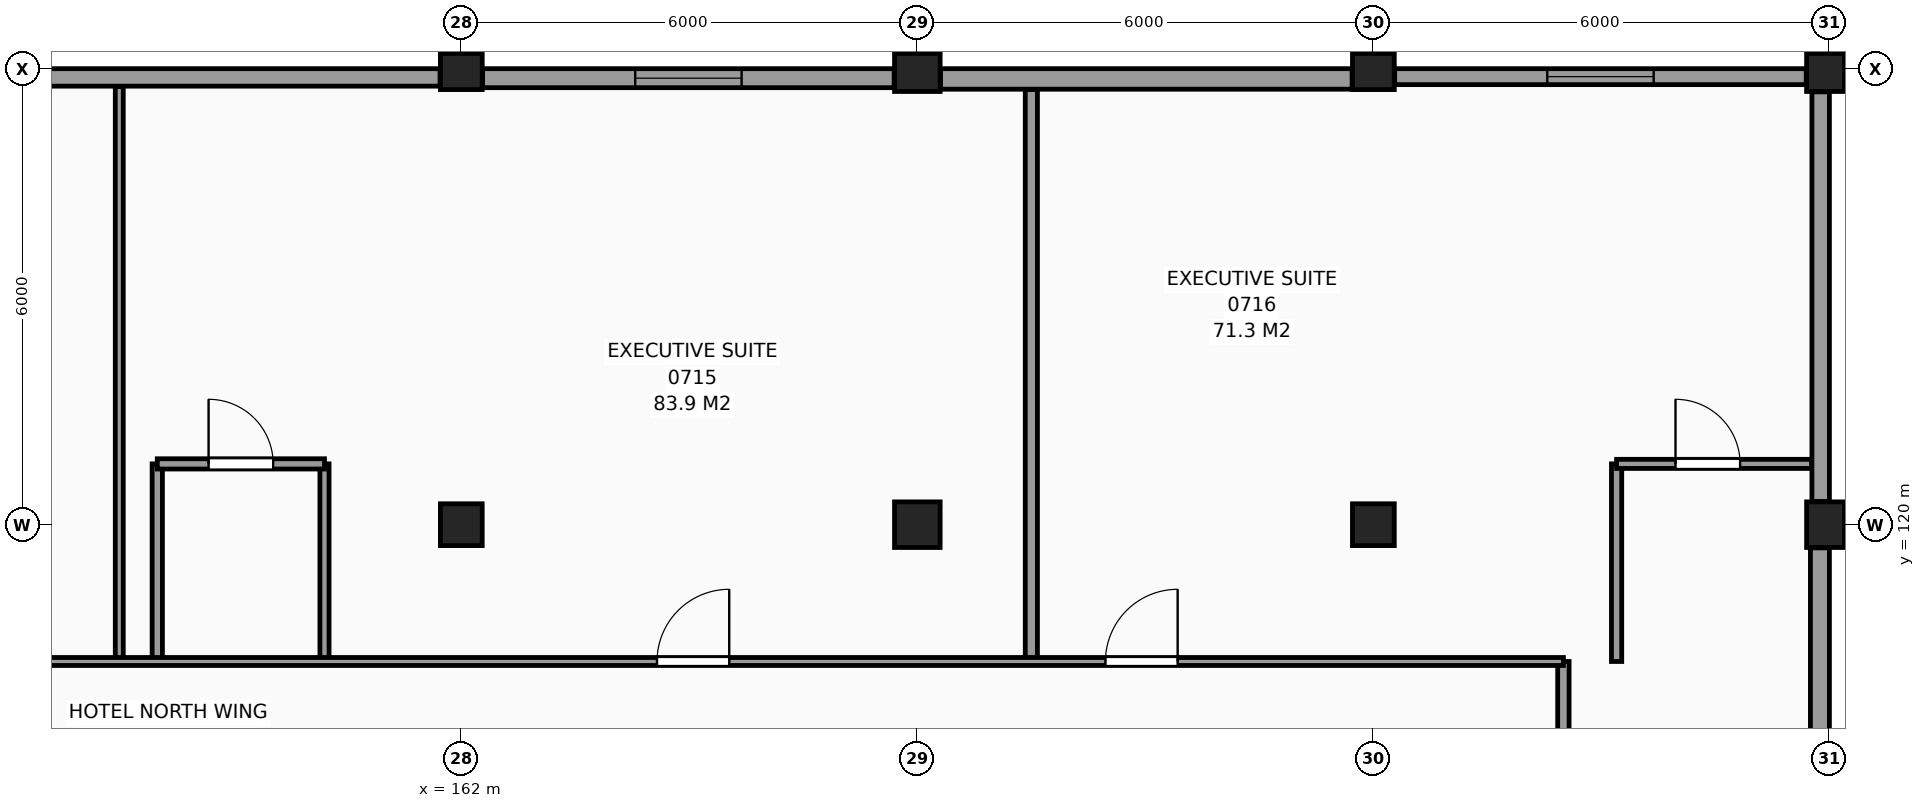
"""IFC4 building model, lengths in metres.
Left out: names, types, materials, properties, quantities, classifications, styles, units other than length and angle.
Written with IfcOpenShell. Run it as: python <this file> out.ifc"""

import sys

from ifc_helpers import new_model, si_unit, direction, frame, frame_2d, origin, origin_2d, place, context, subcontext, project, spatial, rectangle, extrude, element, fill, save


model = new_model("IFC4")
c1 = context("Model", 3, precision=1e-05, world=origin(), true_north=direction((0.0, 1.0)))
c2 = subcontext(c1, "Body", "Model", "MODEL_VIEW")
j1 = project(units=[si_unit("LENGTHUNIT", "METRE"), si_unit("PLANEANGLEUNIT", "RADIAN")], contexts=[c1])
p1 = place(None, origin())
s1 = spatial("IfcSite", under=j1, at=p1, CompositionType="ELEMENT")
p2 = place(p1, origin())
s2 = spatial("IfcBuilding", under=s1, at=p2, CompositionType="ELEMENT")
p3 = place(p2, frame((0.0, 0.0, 31.5)))
s3 = spatial("IfcBuildingStorey", under=s2, at=p3, CompositionType="ELEMENT", Elevation=31.5)
for number, where, z_axis, x_axis in (
    (1, (162.0, 120.0, 0.0), (0.0, 0.0, 1.0), (1.0, 0.0, 0.0)),
    (2, (162.0, 126.0, 0.0), (0.0, 0.0, 1.0), (1.0, 0.0, 0.0)),
):
    element("IfcColumn", number, at=place(p3, frame(where, z_axis=z_axis, x_axis=x_axis)), inside=s3, PredefinedType="COLUMN", context=c2, shape_type="SweptSolid", body=[
        extrude(rectangle(XDim=0.55, YDim=0.55, at=origin_2d()), origin(), (0.0, 0.0, 1.0), 3.3),
    ])
for number, where, z_axis, x_axis in (
    (3, (168.0, 120.0, 0.0), (0.0, 0.0, 1.0), (1.0, 0.0, 0.0)),
    (4, (168.0, 126.0, 0.0), (0.0, 0.0, 1.0), (1.0, 0.0, 0.0)),
):
    element("IfcColumn", number, at=place(p3, frame(where, z_axis=z_axis, x_axis=x_axis)), inside=s3, PredefinedType="COLUMN", context=c2, shape_type="SweptSolid", body=[
        extrude(rectangle(XDim=0.6, YDim=0.6, at=origin_2d()), origin(), (0.0, 0.0, 1.0), 3.3),
    ])
for number, where, z_axis, x_axis in (
    (5, (174.0, 120.0, 0.0), (0.0, 0.0, 1.0), (1.0, 0.0, 0.0)),
    (6, (174.0, 126.0, 0.0), (0.0, 0.0, 1.0), (1.0, 0.0, 0.0)),
):
    element("IfcColumn", number, at=place(p3, frame(where, z_axis=z_axis, x_axis=x_axis)), inside=s3, PredefinedType="COLUMN", context=c2, shape_type="SweptSolid", body=[
        extrude(rectangle(XDim=0.55, YDim=0.55, at=origin_2d()), origin(), (0.0, 0.0, 1.0), 3.3),
    ])
for number, where, z_axis, x_axis in (
    (7, (180.0, 120.0, 0.0), (0.0, 0.0, 1.0), (1.0, 0.0, 0.0)),
    (8, (180.0, 126.0, 0.0), (0.0, 0.0, 1.0), (1.0, 0.0, 0.0)),
):
    element("IfcColumn", number, at=place(p3, frame(where, z_axis=z_axis, x_axis=x_axis)), inside=s3, PredefinedType="COLUMN", context=c2, shape_type="SweptSolid", body=[
        extrude(rectangle(XDim=0.6, YDim=0.6, at=origin_2d()), origin(), (0.0, 0.0, 1.0), 3.3),
    ])
p4 = place(p3, frame((179.875, 114.305, 0.0), z_axis=(0.0, 0.0, 1.0), x_axis=(0.0, 1.0, 0.0)))
e9 = element("IfcWall", 9, at=p4, inside=s3, PredefinedType="SOLIDWALL", context=c2, shape_type="SweptSolid", body=[
    extrude(rectangle(XDim=5.39, YDim=0.25, at=frame_2d((2.695, 0.0))), origin(), (0.0, 0.0, 1.0), 2.42),
])
p5 = place(p3, frame((179.885, 120.305, 0.0), z_axis=(0.0, 0.0, 1.0), x_axis=(0.0, 1.0, 0.0)))
e10 = element("IfcWall", 10, at=p5, inside=s3, PredefinedType="SOLIDWALL", context=c2, shape_type="SweptSolid", body=[
    extrude(rectangle(XDim=5.39, YDim=0.23, at=frame_2d((2.695, 0.0))), origin(), (0.0, 0.0, 1.0), 2.42),
])
p6 = place(p3, frame((179.695, 125.895, 0.0), z_axis=(0.0, 0.0, 1.0), x_axis=(-1.0, 0.0, 0.0)))
e11 = element("IfcWall", 11, at=p6, inside=s3, PredefinedType="SOLIDWALL", context=c2, shape_type="SweptSolid", body=[
    extrude(rectangle(XDim=5.415, YDim=0.21, at=frame_2d((2.708, 0.0))), origin(), (0.0, 0.0, 1.0), 2.42),
])
p7 = place(p6, frame((2.007, 0.0, 0.8)))
e12 = element("IfcOpeningElement", 12, at=p7, cuts=e11, PredefinedType="OPENING", context=c2, shape_type="SweptSolid", body=[
    extrude(rectangle(XDim=1.4, YDim=1.4, at=frame_2d((0.7, 0.7))), frame((0.0, 0.115, 0.0), z_axis=(0.0, -1.0, 0.0), x_axis=(1.0, 0.0, 0.0)), (0.0, 0.0, 1.0), 0.23),
])
p8 = place(p3, frame((173.72, 125.865, 0.0), z_axis=(0.0, 0.0, 1.0), x_axis=(-1.0, 0.0, 0.0)))
e13 = element("IfcWall", 13, at=p8, inside=s3, PredefinedType="SOLIDWALL", context=c2, shape_type="SweptSolid", body=[
    extrude(rectangle(XDim=5.415, YDim=0.27, at=frame_2d((2.708, 0.0))), origin(), (0.0, 0.0, 1.0), 2.42),
])
p9 = place(p3, frame((167.695, 125.875, 0.0), z_axis=(0.0, 0.0, 1.0), x_axis=(-1.0, 0.0, 0.0)))
e14 = element("IfcWall", 14, at=p9, inside=s3, PredefinedType="SOLIDWALL", context=c2, shape_type="SweptSolid", body=[
    extrude(rectangle(XDim=5.415, YDim=0.25, at=frame_2d((2.708, 0.0))), origin(), (0.0, 0.0, 1.0), 2.42),
])
p10 = place(p9, frame((2.007, 0.0, 0.8)))
e15 = element("IfcOpeningElement", 15, at=p10, cuts=e14, PredefinedType="OPENING", context=c2, shape_type="SweptSolid", body=[
    extrude(rectangle(XDim=1.4, YDim=1.4, at=frame_2d((0.7, 0.7))), frame((0.0, 0.135, 0.0), z_axis=(0.0, -1.0, 0.0), x_axis=(1.0, 0.0, 0.0)), (0.0, 0.0, 1.0), 0.27),
])
p11 = place(p3, frame((161.72, 125.885, 0.0), z_axis=(0.0, 0.0, 1.0), x_axis=(-1.0, 0.0, 0.0)))
e16 = element("IfcWall", 16, at=p11, inside=s3, PredefinedType="SOLIDWALL", context=c2, shape_type="SweptSolid", body=[
    extrude(rectangle(XDim=5.415, YDim=0.23, at=frame_2d((2.708, 0.0))), origin(), (0.0, 0.0, 1.0), 2.42),
])
p12 = place(p3, frame((157.5, 118.2, 0.0), z_axis=(0.0, 0.0, 1.0), x_axis=(0.0, 1.0, 0.0)))
e17 = element("IfcWall", 17, at=p12, inside=s3, PredefinedType="PARTITIONING", context=c2, shape_type="SweptSolid", body=[
    extrude(rectangle(XDim=7.565, YDim=0.105, at=frame_2d((3.782, 0.0))), origin(), (0.0, 0.0, 1.0), 3.07),
])
p13 = place(p3, frame((158.0, 118.2, 0.0), z_axis=(0.0, 0.0, 1.0), x_axis=(0.0, 1.0, 0.0)))
e18 = element("IfcWall", 18, at=p13, inside=s3, PredefinedType="PARTITIONING", context=c2, shape_type="SweptSolid", body=[
    extrude(rectangle(XDim=2.6, YDim=0.135, at=frame_2d((1.3, 0.0))), origin(), (0.0, 0.0, 1.0), 3.07),
])
p14 = place(p3, frame((160.2, 118.2, 0.0), z_axis=(0.0, 0.0, 1.0), x_axis=(0.0, 1.0, 0.0)))
e19 = element("IfcWall", 19, at=p14, inside=s3, PredefinedType="PARTITIONING", context=c2, shape_type="SweptSolid", body=[
    extrude(rectangle(XDim=2.6, YDim=0.12, at=frame_2d((1.3, 0.0))), origin(), (0.0, 0.0, 1.0), 3.07),
])
p15 = place(p3, frame((169.5, 118.2, 0.0), z_axis=(0.0, 0.0, 1.0), x_axis=(0.0, 1.0, 0.0)))
e20 = element("IfcWall", 20, at=p15, inside=s3, PredefinedType="PARTITIONING", context=c2, shape_type="SweptSolid", body=[
    extrude(rectangle(XDim=7.525, YDim=0.16, at=frame_2d((3.763, 0.0))), origin(), (0.0, 0.0, 1.0), 3.07),
])
p16 = place(p3, frame((176.5, 115.8, 0.0), z_axis=(0.0, 0.0, 1.0), x_axis=(0.0, 1.0, 0.0)))
e21 = element("IfcWall", 21, at=p16, inside=s3, PredefinedType="PARTITIONING", context=c2, shape_type="SweptSolid", body=[
    extrude(rectangle(XDim=2.4, YDim=0.15, at=frame_2d((1.2, 0.0))), origin(), (0.0, 0.0, 1.0), 3.07),
])
p17 = place(p3, frame((177.2, 118.2, 0.0), z_axis=(0.0, 0.0, 1.0), x_axis=(0.0, 1.0, 0.0)))
e22 = element("IfcWall", 22, at=p17, inside=s3, PredefinedType="PARTITIONING", context=c2, shape_type="SweptSolid", body=[
    extrude(rectangle(XDim=2.6, YDim=0.135, at=frame_2d((1.3, 0.0))), origin(), (0.0, 0.0, 1.0), 3.07),
])
p18 = place(p3, frame((66.215, 118.2, 0.0), z_axis=(0.0, 0.0, 1.0), x_axis=(1.0, 0.0, 0.0)))
e23 = element("IfcWall", 23, at=p18, inside=s3, PredefinedType="PARTITIONING", context=c2, shape_type="SweptSolid", body=[
    extrude(rectangle(XDim=110.285, YDim=0.105, at=frame_2d((55.143, 0.0))), origin(), (0.0, 0.0, 1.0), 3.07),
])
p19 = place(p18, frame((8.36, 0.0, 0.0)))
e24 = element("IfcOpeningElement", 24, at=p19, cuts=e23, PredefinedType="OPENING", context=c2, shape_type="SweptSolid", body=[
    extrude(rectangle(XDim=0.95, YDim=2.1, at=frame_2d((0.475, 1.05))), frame((0.0, 0.062, 0.0), z_axis=(0.0, -1.0, 0.0), x_axis=(1.0, 0.0, 0.0)), (0.0, 0.0, 1.0), 0.125),
])
p20 = place(p18, frame((12.51, 0.0, 0.0)))
e25 = element("IfcOpeningElement", 25, at=p20, cuts=e23, PredefinedType="OPENING", context=c2, shape_type="SweptSolid", body=[
    extrude(rectangle(XDim=0.95, YDim=2.1, at=frame_2d((0.475, 1.05))), frame((0.0, 0.062, 0.0), z_axis=(0.0, -1.0, 0.0), x_axis=(1.0, 0.0, 0.0)), (0.0, 0.0, 1.0), 0.125),
])
p21 = place(p18, frame((16.91, 0.0, 0.0)))
e26 = element("IfcOpeningElement", 26, at=p21, cuts=e23, PredefinedType="OPENING", context=c2, shape_type="SweptSolid", body=[
    extrude(rectangle(XDim=0.95, YDim=2.1, at=frame_2d((0.475, 1.05))), frame((0.0, 0.062, 0.0), z_axis=(0.0, -1.0, 0.0), x_axis=(1.0, 0.0, 0.0)), (0.0, 0.0, 1.0), 0.125),
])
p22 = place(p18, frame((21.41, 0.0, 0.0)))
e27 = element("IfcOpeningElement", 27, at=p22, cuts=e23, PredefinedType="OPENING", context=c2, shape_type="SweptSolid", body=[
    extrude(rectangle(XDim=0.95, YDim=2.1, at=frame_2d((0.475, 1.05))), frame((0.0, 0.062, 0.0), z_axis=(0.0, -1.0, 0.0), x_axis=(1.0, 0.0, 0.0)), (0.0, 0.0, 1.0), 0.125),
])
p23 = place(p18, frame((30.51, 0.0, 0.0)))
e28 = element("IfcOpeningElement", 28, at=p23, cuts=e23, PredefinedType="OPENING", context=c2, shape_type="SweptSolid", body=[
    extrude(rectangle(XDim=0.95, YDim=2.1, at=frame_2d((0.475, 1.05))), frame((0.0, 0.062, 0.0), z_axis=(0.0, -1.0, 0.0), x_axis=(1.0, 0.0, 0.0)), (0.0, 0.0, 1.0), 0.125),
])
p24 = place(p18, frame((34.91, 0.0, 0.0)))
e29 = element("IfcOpeningElement", 29, at=p24, cuts=e23, PredefinedType="OPENING", context=c2, shape_type="SweptSolid", body=[
    extrude(rectangle(XDim=0.95, YDim=2.1, at=frame_2d((0.475, 1.05))), frame((0.0, 0.062, 0.0), z_axis=(0.0, -1.0, 0.0), x_axis=(1.0, 0.0, 0.0)), (0.0, 0.0, 1.0), 0.125),
])
p25 = place(p18, frame((42.11, 0.0, 0.0)))
e30 = element("IfcOpeningElement", 30, at=p25, cuts=e23, PredefinedType="OPENING", context=c2, shape_type="SweptSolid", body=[
    extrude(rectangle(XDim=0.95, YDim=2.1, at=frame_2d((0.475, 1.05))), frame((0.0, 0.062, 0.0), z_axis=(0.0, -1.0, 0.0), x_axis=(1.0, 0.0, 0.0)), (0.0, 0.0, 1.0), 0.125),
])
p26 = place(p18, frame((50.36, 0.0, 0.0)))
e31 = element("IfcOpeningElement", 31, at=p26, cuts=e23, PredefinedType="OPENING", context=c2, shape_type="SweptSolid", body=[
    extrude(rectangle(XDim=0.95, YDim=2.1, at=frame_2d((0.475, 1.05))), frame((0.0, 0.062, 0.0), z_axis=(0.0, -1.0, 0.0), x_axis=(1.0, 0.0, 0.0)), (0.0, 0.0, 1.0), 0.125),
])
p27 = place(p18, frame((62.36, 0.0, 0.0)))
e32 = element("IfcOpeningElement", 32, at=p27, cuts=e23, PredefinedType="OPENING", context=c2, shape_type="SweptSolid", body=[
    extrude(rectangle(XDim=0.95, YDim=2.1, at=frame_2d((0.475, 1.05))), frame((0.0, 0.062, 0.0), z_axis=(0.0, -1.0, 0.0), x_axis=(1.0, 0.0, 0.0)), (0.0, 0.0, 1.0), 0.125),
])
p28 = place(p18, frame((64.91, 0.0, 0.0)))
e33 = element("IfcOpeningElement", 33, at=p28, cuts=e23, PredefinedType="OPENING", context=c2, shape_type="SweptSolid", body=[
    extrude(rectangle(XDim=0.95, YDim=2.1, at=frame_2d((0.475, 1.05))), frame((0.0, 0.062, 0.0), z_axis=(0.0, -1.0, 0.0), x_axis=(1.0, 0.0, 0.0)), (0.0, 0.0, 1.0), 0.125),
])
p29 = place(p18, frame((72.11, 0.0, 0.0)))
e34 = element("IfcOpeningElement", 34, at=p29, cuts=e23, PredefinedType="OPENING", context=c2, shape_type="SweptSolid", body=[
    extrude(rectangle(XDim=0.95, YDim=2.1, at=frame_2d((0.475, 1.05))), frame((0.0, 0.062, 0.0), z_axis=(0.0, -1.0, 0.0), x_axis=(1.0, 0.0, 0.0)), (0.0, 0.0, 1.0), 0.125),
])
p30 = place(p18, frame((76.31, 0.0, 0.0)))
e35 = element("IfcOpeningElement", 35, at=p30, cuts=e23, PredefinedType="OPENING", context=c2, shape_type="SweptSolid", body=[
    extrude(rectangle(XDim=0.95, YDim=2.1, at=frame_2d((0.475, 1.05))), frame((0.0, 0.062, 0.0), z_axis=(0.0, -1.0, 0.0), x_axis=(1.0, 0.0, 0.0)), (0.0, 0.0, 1.0), 0.125),
])
p31 = place(p18, frame((78.51, 0.0, 0.0)))
e36 = element("IfcOpeningElement", 36, at=p31, cuts=e23, PredefinedType="OPENING", context=c2, shape_type="SweptSolid", body=[
    extrude(rectangle(XDim=0.95, YDim=2.1, at=frame_2d((0.475, 1.05))), frame((0.0, 0.062, 0.0), z_axis=(0.0, -1.0, 0.0), x_axis=(1.0, 0.0, 0.0)), (0.0, 0.0, 1.0), 0.125),
])
p32 = place(p18, frame((84.51, 0.0, 0.0)))
e37 = element("IfcOpeningElement", 37, at=p32, cuts=e23, PredefinedType="OPENING", context=c2, shape_type="SweptSolid", body=[
    extrude(rectangle(XDim=0.95, YDim=2.1, at=frame_2d((0.475, 1.05))), frame((0.0, 0.062, 0.0), z_axis=(0.0, -1.0, 0.0), x_axis=(1.0, 0.0, 0.0)), (0.0, 0.0, 1.0), 0.125),
])
p33 = place(p18, frame((98.36, 0.0, 0.0)))
e38 = element("IfcOpeningElement", 38, at=p33, cuts=e23, PredefinedType="OPENING", context=c2, shape_type="SweptSolid", body=[
    extrude(rectangle(XDim=0.95, YDim=2.1, at=frame_2d((0.475, 1.05))), frame((0.0, 0.062, 0.0), z_axis=(0.0, -1.0, 0.0), x_axis=(1.0, 0.0, 0.0)), (0.0, 0.0, 1.0), 0.125),
])
p34 = place(p18, frame((104.26, 0.0, 0.0)))
e39 = element("IfcOpeningElement", 39, at=p34, cuts=e23, PredefinedType="OPENING", context=c2, shape_type="SweptSolid", body=[
    extrude(rectangle(XDim=0.95, YDim=2.1, at=frame_2d((0.475, 1.05))), frame((0.0, 0.062, 0.0), z_axis=(0.0, -1.0, 0.0), x_axis=(1.0, 0.0, 0.0)), (0.0, 0.0, 1.0), 0.125),
])
p35 = place(p3, frame((158.0, 120.8, 0.0), z_axis=(0.0, 0.0, 1.0), x_axis=(1.0, 0.0, 0.0)))
e40 = element("IfcWall", 40, at=p35, inside=s3, PredefinedType="PARTITIONING", context=c2, shape_type="SweptSolid", body=[
    extrude(rectangle(XDim=2.2, YDim=0.135, at=frame_2d((1.1, 0.0))), origin(), (0.0, 0.0, 1.0), 3.07),
])
p36 = place(p35, frame((0.675, 0.0, 0.0)))
e41 = element("IfcOpeningElement", 41, at=p36, cuts=e40, PredefinedType="OPENING", context=c2, shape_type="SweptSolid", body=[
    extrude(rectangle(XDim=0.85, YDim=2.1, at=frame_2d((0.425, 1.05))), frame((0.0, 0.078, 0.0), z_axis=(0.0, -1.0, 0.0), x_axis=(1.0, 0.0, 0.0)), (0.0, 0.0, 1.0), 0.155),
])
p37 = place(p3, frame((177.2, 120.8, 0.0), z_axis=(0.0, 0.0, 1.0), x_axis=(1.0, 0.0, 0.0)))
e42 = element("IfcWall", 42, at=p37, inside=s3, PredefinedType="PARTITIONING", context=c2, shape_type="SweptSolid", body=[
    extrude(rectangle(XDim=2.565, YDim=0.12, at=frame_2d((1.282, 0.0))), origin(), (0.0, 0.0, 1.0), 3.07),
])
p38 = place(p37, frame((0.775, 0.0, 0.0)))
e43 = element("IfcOpeningElement", 43, at=p38, cuts=e42, PredefinedType="OPENING", context=c2, shape_type="SweptSolid", body=[
    extrude(rectangle(XDim=0.85, YDim=2.1, at=frame_2d((0.425, 1.05))), frame((0.0, 0.07, 0.0), z_axis=(0.0, -1.0, 0.0), x_axis=(1.0, 0.0, 0.0)), (0.0, 0.0, 1.0), 0.14),
])
p39 = place(p10, origin())
e44 = element("IfcWindow", 44, at=p39, inside=s3, PartitioningType="SINGLE_PANEL", PredefinedType="WINDOW", context=c2, shape_type="SweptSolid", body=[
    extrude(rectangle(XDim=1.4, YDim=1.4, at=frame_2d((0.7, 0.7))), frame((0.0, 0.03, 0.0), z_axis=(0.0, -1.0, 0.0), x_axis=(1.0, 0.0, 0.0)), (0.0, 0.0, 1.0), 0.06),
])
fill(e15, e44)
p40 = place(p7, origin())
e45 = element("IfcWindow", 45, at=p40, inside=s3, PartitioningType="SINGLE_PANEL", PredefinedType="WINDOW", context=c2, shape_type="SweptSolid", body=[
    extrude(rectangle(XDim=1.4, YDim=1.4, at=frame_2d((0.7, 0.7))), frame((0.0, 0.03, 0.0), z_axis=(0.0, -1.0, 0.0), x_axis=(1.0, 0.0, 0.0)), (0.0, 0.0, 1.0), 0.06),
])
fill(e12, e45)
p41 = place(p36, origin())
e46 = element("IfcDoor", 46, at=p41, inside=s3, OperationType="SINGLE_SWING_LEFT", PredefinedType="DOOR", context=c2, shape_type="SweptSolid", body=[
    extrude(rectangle(XDim=0.85, YDim=2.1, at=frame_2d((0.425, 1.05))), frame((0.0, 0.025, 0.0), z_axis=(0.0, -1.0, 0.0), x_axis=(1.0, 0.0, 0.0)), (0.0, 0.0, 1.0), 0.05),
])
fill(e41, e46)
p42 = place(p33, origin())
e47 = element("IfcDoor", 47, at=p42, inside=s3, OperationType="SINGLE_SWING_RIGHT", PredefinedType="DOOR", context=c2, shape_type="SweptSolid", body=[
    extrude(rectangle(XDim=0.95, YDim=2.1, at=frame_2d((0.475, 1.05))), frame((0.0, 0.025, 0.0), z_axis=(0.0, -1.0, 0.0), x_axis=(1.0, 0.0, 0.0)), (0.0, 0.0, 1.0), 0.05),
])
fill(e38, e47)
p43 = place(p38, origin())
e48 = element("IfcDoor", 48, at=p43, inside=s3, OperationType="SINGLE_SWING_LEFT", PredefinedType="DOOR", context=c2, shape_type="SweptSolid", body=[
    extrude(rectangle(XDim=0.85, YDim=2.1, at=frame_2d((0.425, 1.05))), frame((0.0, 0.025, 0.0), z_axis=(0.0, -1.0, 0.0), x_axis=(1.0, 0.0, 0.0)), (0.0, 0.0, 1.0), 0.05),
])
fill(e43, e48)
p44 = place(p34, origin())
e49 = element("IfcDoor", 49, at=p44, inside=s3, OperationType="SINGLE_SWING_RIGHT", PredefinedType="DOOR", context=c2, shape_type="SweptSolid", body=[
    extrude(rectangle(XDim=0.95, YDim=2.1, at=frame_2d((0.475, 1.05))), frame((0.0, 0.025, 0.0), z_axis=(0.0, -1.0, 0.0), x_axis=(1.0, 0.0, 0.0)), (0.0, 0.0, 1.0), 0.05),
])
fill(e39, e49)
save(model, sys.argv[1])
